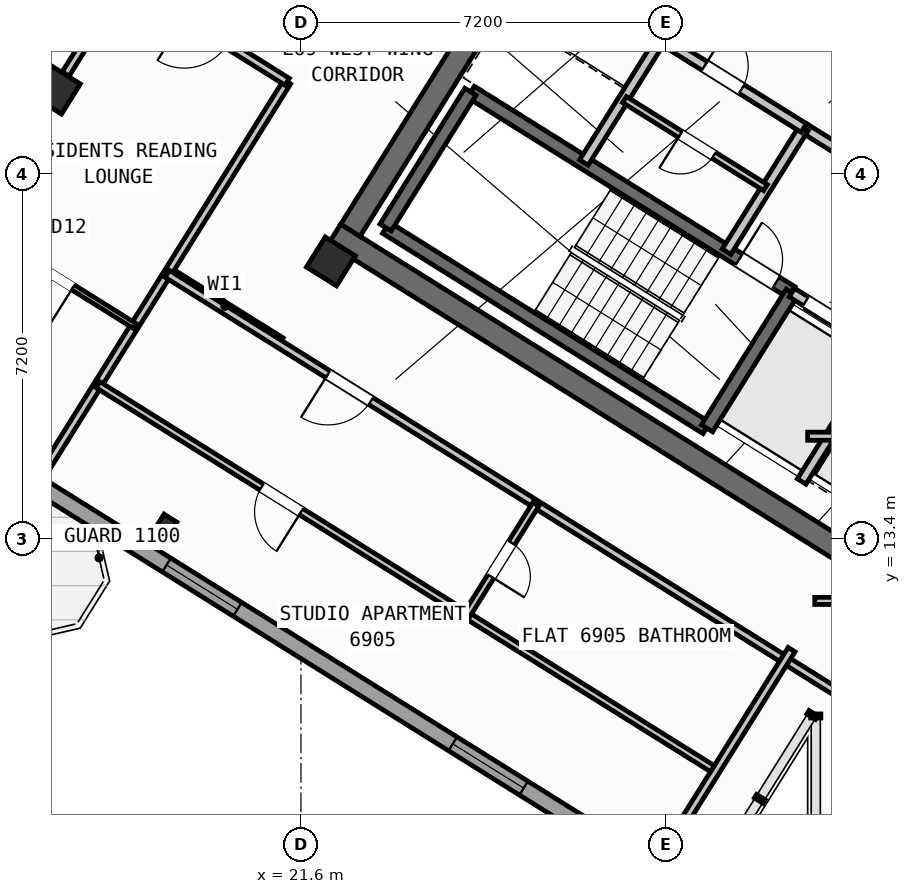
"""IFC4 building model, lengths in metres.
Left out: names, types, materials, properties, quantities, classifications, styles, units other than length and angle.
Written with IfcOpenShell. Run it as: python <this file> out.ifc"""

import sys

from ifc_helpers import new_model, si_unit, direction, frame, frame_2d, origin, origin_2d, place, context, subcontext, project, spatial, rectangle, hollow_rectangle, i_section, extrude, source, transform, mapped, element, fill, save


model = new_model("IFC4")
c1 = context("Model", 3, precision=1e-05, world=origin(), true_north=direction((0.0, 1.0)))
c2 = subcontext(c1, "Body", "Model", "MODEL_VIEW")
j1 = project(units=[si_unit("LENGTHUNIT", "METRE"), si_unit("PLANEANGLEUNIT", "RADIAN")], contexts=[c1])
p1 = place(None, origin())
s1 = spatial("IfcSite", under=j1, at=p1, CompositionType="ELEMENT")
p2 = place(p1, origin())
s2 = spatial("IfcBuilding", under=s1, at=p2, CompositionType="ELEMENT")
p3 = place(p2, frame((0.0, 0.0, 273.6)))
s3 = spatial("IfcBuildingStorey", under=s2, at=p3, CompositionType="ELEMENT", Elevation=273.6)
p4 = place(p3, frame((33.324, 12.503, 0.0), z_axis=(0.0, 0.0, 1.0), x_axis=(-0.848043529849, 0.529926571782, 0.0)))
e1 = element("IfcWall", 1, at=p4, inside=s3, PredefinedType="SHEAR", context=c2, shape_type="SweptSolid", body=[
    extrude(rectangle(XDim=13.04, YDim=0.45, at=frame_2d((6.52, 0.0))), origin(), (0.0, 0.0, 1.0), 3.35),
])
p5 = place(p3, frame((26.007, 24.976, 0.0), z_axis=(0.0, 0.0, 1.0), x_axis=(-0.529931155655, -0.848040665456, 0.0)))
e2 = element("IfcWall", 2, at=p5, inside=s3, PredefinedType="SHEAR", context=c2, shape_type="SweptSolid", body=[
    extrude(rectangle(XDim=6.475, YDim=0.45, at=frame_2d((3.238, 0.0))), origin(), (0.0, 0.0, 1.0), 3.35),
])
m1 = source(origin(), c2, "Body", "SweptSolid", [
    extrude(hollow_rectangle(XDim=0.7, YDim=0.7, WallThickness=0.028, at=origin_2d()), origin(), (0.0, 0.0, 1.0), 3.6),
])
p6 = place(p3, frame((22.191, 18.87, 0.0), z_axis=(0.0, 0.0, 1.0), x_axis=(-0.848048096156, 0.529919264233, 0.0)))
e3 = element("IfcColumn", 3, at=p6, inside=s3, PredefinedType="COLUMN", context=c2, shape_type="MappedRepresentation", body=[
    mapped(m1, transform((0.0, 0.0, 0.0), scale=1.0)),
])
m2 = source(origin(), c2, "Body", "SweptSolid", [
    extrude(i_section(OverallWidth=0.3, OverallDepth=0.45, WebThickness=0.014, FlangeThickness=0.026, at=origin_2d()), origin(), (0.0, 0.0, 1.0), 3.6),
])
p7 = place(p3, frame((18.906, 13.612, 0.0), z_axis=(0.0, 0.0, 1.0), x_axis=(-0.848048096156, 0.529919264233, 0.0)))
e4 = element("IfcColumn", 4, at=p7, inside=s3, PredefinedType="COLUMN", context=c2, shape_type="MappedRepresentation", body=[
    mapped(m2, transform((0.0, 0.0, 0.0), scale=1.0)),
])
p8 = place(p3, frame((16.764, 22.261, 0.0), z_axis=(0.0, 0.0, 1.0), x_axis=(-0.848048096156, 0.529919264233, 0.0)))
e5 = element("IfcColumn", 5, at=p8, inside=s3, PredefinedType="COLUMN", context=c2, shape_type="MappedRepresentation", body=[
    mapped(m1, transform((0.0, 0.0, 0.0), scale=1.0)),
])
p9 = place(p3, frame((29.268, 6.429, 0.0), z_axis=(0.0, 0.0, 1.0), x_axis=(-0.848049971435, 0.529916263149, 0.0)))
e6 = element("IfcWall", 6, at=p9, inside=s3, PredefinedType="STANDARD", context=c2, shape_type="SweptSolid", body=[
    extrude(rectangle(XDim=31.588, YDim=0.32, at=frame_2d((15.794, 0.0))), origin(), (0.0, 0.0, 1.0), 3.35),
])
p10 = place(p9, frame((16.362, 0.0, 0.0)))
e7 = element("IfcOpeningElement", 7, at=p10, cuts=e6, PredefinedType="OPENING", context=c2, shape_type="SweptSolid", body=[
    extrude(rectangle(XDim=1.2, YDim=2.15, at=frame_2d((0.6, 1.075))), frame((0.0, 0.17, 0.0), z_axis=(0.0, -1.0, 0.0), x_axis=(1.0, 0.0, 0.0)), (0.0, 0.0, 1.0), 0.34),
])
p11 = place(p9, frame((3.859, 0.0, 0.9)))
e8 = element("IfcOpeningElement", 8, at=p11, cuts=e6, PredefinedType="OPENING", context=c2, shape_type="SweptSolid", body=[
    extrude(rectangle(XDim=1.65, YDim=1.45, at=frame_2d((0.825, 0.725))), frame((0.0, 0.17, 0.0), z_axis=(0.0, -1.0, 0.0), x_axis=(1.0, 0.0, 0.0)), (0.0, 0.0, 1.0), 0.34),
])
p12 = place(p9, frame((10.519, 0.0, 0.9)))
e9 = element("IfcOpeningElement", 9, at=p12, cuts=e6, PredefinedType="OPENING", context=c2, shape_type="SweptSolid", body=[
    extrude(rectangle(XDim=1.65, YDim=1.45, at=frame_2d((0.825, 0.725))), frame((0.0, 0.17, 0.0), z_axis=(0.0, -1.0, 0.0), x_axis=(1.0, 0.0, 0.0)), (0.0, 0.0, 1.0), 0.34),
])
p13 = place(p9, frame((21.219, 0.0, 0.95)))
e10 = element("IfcOpeningElement", 10, at=p13, cuts=e6, PredefinedType="OPENING", context=c2, shape_type="SweptSolid", body=[
    extrude(rectangle(XDim=1.95, YDim=1.35, at=frame_2d((0.975, 0.675))), frame((0.0, 0.17, 0.0), z_axis=(0.0, -1.0, 0.0), x_axis=(1.0, 0.0, 0.0)), (0.0, 0.0, 1.0), 0.34),
])
p14 = place(p9, frame((26.406, 0.0, 1.0)))
e11 = element("IfcOpeningElement", 11, at=p14, cuts=e6, PredefinedType="OPENING", context=c2, shape_type="SweptSolid", body=[
    extrude(rectangle(XDim=0.9, YDim=1.25, at=frame_2d((0.45, 0.625))), frame((0.0, 0.17, 0.0), z_axis=(0.0, -1.0, 0.0), x_axis=(1.0, 0.0, 0.0)), (0.0, 0.0, 1.0), 0.34),
])
p15 = place(p9, frame((29.143, 0.0, 0.9)))
e12 = element("IfcOpeningElement", 12, at=p15, cuts=e6, PredefinedType="OPENING", context=c2, shape_type="SweptSolid", body=[
    extrude(rectangle(XDim=1.65, YDim=1.45, at=frame_2d((0.825, 0.725))), frame((0.0, 0.17, 0.0), z_axis=(0.0, -1.0, 0.0), x_axis=(1.0, 0.0, 0.0)), (0.0, 0.0, 1.0), 0.34),
])
p16 = place(p3, frame((29.605, 15.581, 0.0), z_axis=(0.0, 0.0, 1.0), x_axis=(-0.848036911448, 0.529937163087, 0.0)))
e13 = element("IfcWall", 13, at=p16, inside=s3, PredefinedType="SHEAR", context=c2, shape_type="SweptSolid", body=[
    extrude(rectangle(XDim=7.46, YDim=0.26, at=frame_2d((3.73, 0.0))), origin(), (0.0, 0.0, 1.0), 3.35),
])
p17 = place(p3, frame((31.28, 18.261, 0.0), z_axis=(0.0, 0.0, 1.0), x_axis=(-0.848051618787, 0.529913626805, 0.0)))
e14 = element("IfcWall", 14, at=p17, inside=s3, PredefinedType="SHEAR", context=c2, shape_type="SweptSolid", body=[
    extrude(rectangle(XDim=7.46, YDim=0.26, at=frame_2d((3.73, 0.0))), origin(), (0.0, 0.0, 1.0), 3.35),
])
p18 = place(p17, frame((0.36, 0.0, 0.0)))
e15 = element("IfcOpeningElement", 15, at=p18, cuts=e14, PredefinedType="OPENING", context=c2, shape_type="SweptSolid", body=[
    extrude(rectangle(XDim=0.86, YDim=2.05, at=frame_2d((0.43, 1.025))), frame((0.0, 0.14, 0.0), z_axis=(0.0, -1.0, 0.0), x_axis=(1.0, 0.0, 0.0)), (0.0, 0.0, 1.0), 0.28),
])
p19 = place(p3, frame((31.288, 18.256, 0.0), z_axis=(0.0, 0.0, 1.0), x_axis=(-0.529943379326, -0.848033026897, 0.0)))
e16 = element("IfcWall", 16, at=p19, inside=s3, PredefinedType="SHEAR", context=c2, shape_type="SweptSolid", body=[
    extrude(rectangle(XDim=3.16, YDim=0.26, at=frame_2d((1.58, 0.0))), origin(), (0.0, 0.0, 1.0), 3.35),
])
p20 = place(p3, frame((24.945, 22.22, 0.0), z_axis=(0.0, 0.0, 1.0), x_axis=(-0.529908658664, -0.84805472316, 0.0)))
e17 = element("IfcWall", 17, at=p20, inside=s3, PredefinedType="SHEAR", context=c2, shape_type="SweptSolid", body=[
    extrude(rectangle(XDim=3.16, YDim=0.26, at=frame_2d((1.58, 0.0))), origin(), (0.0, 0.0, 1.0), 3.35),
])
p21 = place(p3, frame((38.046, 21.108, 0.0), z_axis=(0.0, 0.0, 1.0), x_axis=(-0.848054434086, 0.529909121291, 0.0)))
e18 = element("IfcWall", 18, at=p21, inside=s3, PredefinedType="SHEAR", context=c2, shape_type="SweptSolid", body=[
    extrude(rectangle(XDim=7.33, YDim=0.26, at=frame_2d((3.665, 0.0))), origin(), (0.0, 0.0, 1.0), 3.35),
])
p22 = place(p21, frame((0.22, 0.0, 0.0)))
e19 = element("IfcOpeningElement", 19, at=p22, cuts=e18, PredefinedType="OPENING", context=c2, shape_type="SweptSolid", body=[
    extrude(rectangle(XDim=1.1, YDim=2.1, at=frame_2d((0.55, 1.05))), frame((0.0, 0.14, 0.0), z_axis=(0.0, -1.0, 0.0), x_axis=(1.0, 0.0, 0.0)), (0.0, 0.0, 1.0), 0.28),
])
p23 = place(p3, frame((34.933, 15.978, 0.0), z_axis=(0.0, 0.0, 1.0), x_axis=(-0.848055739377, 0.529907032327, 0.0)))
e20 = element("IfcWall", 20, at=p23, inside=s3, PredefinedType="STANDARD", context=c2, shape_type="SweptSolid", body=[
    extrude(rectangle(XDim=4.298, YDim=0.2, at=frame_2d((2.149, 0.0))), origin(), (0.0, 0.0, 1.0), 3.34),
])
p24 = place(p23, frame((0.448, 0.0, 0.0)))
e21 = element("IfcOpeningElement", 21, at=p24, cuts=e20, PredefinedType="OPENING", context=c2, shape_type="SweptSolid", body=[
    extrude(rectangle(XDim=1.3, YDim=2.2, at=frame_2d((0.65, 1.1))), frame((0.0, 0.11, 0.0), z_axis=(0.0, -1.0, 0.0), x_axis=(1.0, 0.0, 0.0)), (0.0, 0.0, 1.0), 0.22),
])
p25 = place(p23, frame((2.523, 0.0, 0.0)))
e22 = element("IfcOpeningElement", 22, at=p25, cuts=e20, PredefinedType="OPENING", context=c2, shape_type="SweptSolid", body=[
    extrude(rectangle(XDim=1.45, YDim=2.25, at=frame_2d((0.725, 1.125))), frame((0.0, 0.11, 0.0), z_axis=(0.0, -1.0, 0.0), x_axis=(1.0, 0.0, 0.0)), (0.0, 0.0, 1.0), 0.22),
])
p26 = place(p3, frame((36.459, 18.421, 0.0), z_axis=(0.0, 0.0, 1.0), x_axis=(-0.848059591691, 0.529900867089, 0.0)))
e23 = element("IfcWall", 23, at=p26, inside=s3, PredefinedType="STANDARD", context=c2, shape_type="SweptSolid", body=[
    extrude(rectangle(XDim=5.818, YDim=0.2, at=frame_2d((2.909, 0.0))), origin(), (0.0, 0.0, 1.0), 3.34),
])
p27 = place(p26, frame((2.598, 0.0, 0.0)))
e24 = element("IfcOpeningElement", 24, at=p27, cuts=e23, PredefinedType="OPENING", context=c2, shape_type="SweptSolid", body=[
    extrude(rectangle(XDim=1.15, YDim=2.1, at=frame_2d((0.575, 1.05))), frame((0.0, 0.11, 0.0), z_axis=(0.0, -1.0, 0.0), x_axis=(1.0, 0.0, 0.0)), (0.0, 0.0, 1.0), 0.22),
])
p28 = place(p3, frame((33.029, 17.003, 0.0), z_axis=(0.0, 0.0, 1.0), x_axis=(-0.529916267533, -0.848049968695, 0.0)))
e25 = element("IfcWall", 25, at=p28, inside=s3, PredefinedType="STANDARD", context=c2, shape_type="SweptSolid", body=[
    extrude(rectangle(XDim=2.92, YDim=0.2, at=frame_2d((1.46, 0.0))), origin(), (0.0, 0.0, 1.0), 3.34),
])
for number, where, z_axis, x_axis in (
    (26, (31.525, 21.504, 0.0), (0.0, 0.0, 1.0), (-0.53, -0.848, 0.0)),
    (27, (28.71, 23.263, 0.0), (0.0, 0.0, 1.0), (-0.53, -0.848, 0.0)),
):
    element("IfcWall", number, at=place(p3, frame(where, z_axis=z_axis, x_axis=x_axis)), inside=s3, PredefinedType="STANDARD", context=c2, shape_type="SweptSolid", body=[
        extrude(rectangle(XDim=2.88, YDim=0.2, at=frame_2d((1.44, 0.0))), origin(), (0.0, 0.0, 1.0), 3.34),
    ])
p29 = place(p3, frame((31.525, 21.504, 0.0), z_axis=(0.0, 0.0, 1.0), x_axis=(-0.848042066329, 0.529928913853, 0.0)))
e28 = element("IfcWall", 28, at=p29, inside=s3, PredefinedType="STANDARD", context=c2, shape_type="SweptSolid", body=[
    extrude(rectangle(XDim=6.268, YDim=0.2, at=frame_2d((3.134, 0.0))), origin(), (0.0, 0.0, 1.0), 3.34),
])
p30 = place(p29, frame((4.4, 0.0, 0.0)))
e29 = element("IfcOpeningElement", 29, at=p30, cuts=e28, PredefinedType="OPENING", context=c2, shape_type="SweptSolid", body=[
    extrude(rectangle(XDim=0.86, YDim=2.05, at=frame_2d((0.43, 1.025))), frame((0.0, 0.11, 0.0), z_axis=(0.0, -1.0, 0.0), x_axis=(1.0, 0.0, 0.0)), (0.0, 0.0, 1.0), 0.22),
])
p31 = place(p29, frame((1.45, 0.0, 0.0)))
e30 = element("IfcOpeningElement", 30, at=p31, cuts=e28, PredefinedType="OPENING", context=c2, shape_type="SweptSolid", body=[
    extrude(rectangle(XDim=0.86, YDim=2.05, at=frame_2d((0.43, 1.025))), frame((0.0, 0.11, 0.0), z_axis=(0.0, -1.0, 0.0), x_axis=(1.0, 0.0, 0.0)), (0.0, 0.0, 1.0), 0.22),
])
p32 = place(p3, frame((30.766, 20.327, 0.0), z_axis=(0.0, 0.0, 1.0), x_axis=(-0.848052663127, 0.529911955482, 0.0)))
e31 = element("IfcWall", 31, at=p32, inside=s3, PredefinedType="PLUMBINGWALL", context=c2, shape_type="SweptSolid", body=[
    extrude(rectangle(XDim=3.28, YDim=0.14, at=frame_2d((1.64, 0.0))), origin(), (0.0, 0.0, 1.0), 3.34),
])
p33 = place(p32, frame((1.2, 0.0, 0.0)))
e32 = element("IfcOpeningElement", 32, at=p33, cuts=e31, PredefinedType="OPENING", context=c2, shape_type="SweptSolid", body=[
    extrude(rectangle(XDim=0.78, YDim=2.05, at=frame_2d((0.39, 1.025))), frame((0.0, 0.08, 0.0), z_axis=(0.0, -1.0, 0.0), x_axis=(1.0, 0.0, 0.0)), (0.0, 0.0, 1.0), 0.16),
])
p34 = place(p3, frame((21.206, 17.292, 0.0), z_axis=(0.0, 0.0, 1.0), x_axis=(-0.848050851465, 0.529914854792, 0.0)))
e33 = element("IfcWall", 33, at=p34, inside=s3, PredefinedType="PARTITIONING", context=c2, shape_type="SweptSolid", body=[
    extrude(rectangle(XDim=2.61, YDim=0.16, at=frame_2d((1.305, 0.0))), origin(), (0.0, 0.0, 1.0), 3.34),
])
p35 = place(p3, frame((21.329, 22.416, 0.0), z_axis=(0.0, 0.0, 1.0), x_axis=(-0.529920220799, -0.848047498427, 0.0)))
e34 = element("IfcWall", 34, at=p35, inside=s3, PredefinedType="PARTITIONING", context=c2, shape_type="SweptSolid", body=[
    extrude(rectangle(XDim=9.2, YDim=0.16, at=frame_2d((4.6, 0.0))), origin(), (0.0, 0.0, 1.0), 3.34),
])
p36 = place(p3, frame((21.329, 22.416, 0.0), z_axis=(0.0, 0.0, 1.0), x_axis=(-0.848052408131, 0.529912363569, 0.0)))
e35 = element("IfcWall", 35, at=p36, inside=s3, PredefinedType="PARTITIONING", context=c2, shape_type="SweptSolid", body=[
    extrude(rectangle(XDim=16.73, YDim=0.16, at=frame_2d((8.365, 0.0))), origin(), (0.0, 0.0, 1.0), 3.34),
])
p37 = place(p36, frame((1.395, 0.0, 0.0)))
e36 = element("IfcOpeningElement", 36, at=p37, cuts=e35, PredefinedType="OPENING", context=c2, shape_type="SweptSolid", body=[
    extrude(rectangle(XDim=1.0, YDim=2.1, at=frame_2d((0.5, 1.05))), frame((0.0, 0.09, 0.0), z_axis=(0.0, -1.0, 0.0), x_axis=(1.0, 0.0, 0.0)), (0.0, 0.0, 1.0), 0.18),
])
p38 = place(p36, frame((7.82, 0.0, 0.0)))
e37 = element("IfcOpeningElement", 37, at=p38, cuts=e35, PredefinedType="OPENING", context=c2, shape_type="SweptSolid", body=[
    extrude(rectangle(XDim=1.0, YDim=2.1, at=frame_2d((0.5, 1.05))), frame((0.0, 0.09, 0.0), z_axis=(0.0, -1.0, 0.0), x_axis=(1.0, 0.0, 0.0)), (0.0, 0.0, 1.0), 0.18),
])
p39 = place(p36, frame((11.14, 0.0, 0.0)))
e38 = element("IfcOpeningElement", 38, at=p39, cuts=e35, PredefinedType="OPENING", context=c2, shape_type="SweptSolid", body=[
    extrude(rectangle(XDim=1.0, YDim=2.1, at=frame_2d((0.5, 1.05))), frame((0.0, 0.09, 0.0), z_axis=(0.0, -1.0, 0.0), x_axis=(1.0, 0.0, 0.0)), (0.0, 0.0, 1.0), 0.18),
])
p40 = place(p3, frame((18.115, 24.424, 0.0), z_axis=(0.0, 0.0, 1.0), x_axis=(-0.529998940003, -0.847998304005, 0.0)))
e39 = element("IfcWall", 39, at=p40, inside=s3, PredefinedType="PARTITIONING", context=c2, shape_type="SweptSolid", body=[
    extrude(rectangle(XDim=2.188, YDim=0.16, at=frame_2d((1.094, 0.0))), origin(), (0.0, 0.0, 1.0), 2.875),
])
p41 = place(p3, frame((18.318, 17.597, 0.0), z_axis=(0.0, 0.0, 1.0), x_axis=(-0.848059820872, 0.529900500304, 0.0)))
e40 = element("IfcWall", 40, at=p41, inside=s3, PredefinedType="PARTITIONING", context=c2, shape_type="SweptSolid", body=[
    extrude(rectangle(XDim=3.79, YDim=0.11, at=frame_2d((1.895, 0.0))), origin(), (0.0, 0.0, 1.0), 3.34),
])
p42 = place(p41, frame((1.435, 0.0, 0.0)))
e41 = element("IfcOpeningElement", 41, at=p42, cuts=e40, PredefinedType="OPENING", context=c2, shape_type="SweptSolid", body=[
    extrude(rectangle(XDim=0.92, YDim=2.08, at=frame_2d((0.46, 1.04))), frame((0.0, 0.065, 0.0), z_axis=(0.0, -1.0, 0.0), x_axis=(1.0, 0.0, 0.0)), (0.0, 0.0, 1.0), 0.13),
])
p43 = place(p3, frame((32.164, 10.374, 0.0), z_axis=(0.0, 0.0, 1.0), x_axis=(-0.848044107957, 0.529925646633, 0.0)))
e42 = element("IfcWall", 42, at=p43, inside=s3, PredefinedType="PARTITIONING", context=c2, shape_type="SweptSolid", body=[
    extrude(rectangle(XDim=15.57, YDim=0.16, at=frame_2d((7.785, 0.0))), origin(), (0.0, 0.0, 1.0), 3.34),
])
p44 = place(p43, frame((10.83, 0.0, 0.0)))
e43 = element("IfcOpeningElement", 43, at=p44, cuts=e42, PredefinedType="OPENING", context=c2, shape_type="SweptSolid", body=[
    extrude(rectangle(XDim=1.0, YDim=2.1, at=frame_2d((0.5, 1.05))), frame((0.0, 0.09, 0.0), z_axis=(0.0, -1.0, 0.0), x_axis=(1.0, 0.0, 0.0)), (0.0, 0.0, 1.0), 0.18),
])
p45 = place(p3, frame((31.282, 11.208, 0.0), z_axis=(0.0, 0.0, 1.0), x_axis=(-0.529938869374, -0.84803584519, 0.0)))
e44 = element("IfcWall", 44, at=p45, inside=s3, PredefinedType="PARTITIONING", context=c2, shape_type="SweptSolid", body=[
    extrude(rectangle(XDim=5.48, YDim=0.16, at=frame_2d((2.74, 0.0))), origin(), (0.0, 0.0, 1.0), 3.34),
])
p46 = place(p3, frame((29.72, 8.859, 0.0), z_axis=(0.0, 0.0, 1.0), x_axis=(-0.848049134363, 0.529917602752, 0.0)))
e45 = element("IfcWall", 45, at=p46, inside=s3, PredefinedType="PLUMBINGWALL", context=c2, shape_type="SweptSolid", body=[
    extrude(rectangle(XDim=14.3, YDim=0.14, at=frame_2d((7.15, 0.0))), origin(), (0.0, 0.0, 1.0), 3.34),
])
p47 = place(p46, frame((9.57, 0.0, 0.0)))
e46 = element("IfcOpeningElement", 46, at=p47, cuts=e45, PredefinedType="OPENING", context=c2, shape_type="SweptSolid", body=[
    extrude(rectangle(XDim=0.92, YDim=2.08, at=frame_2d((0.46, 1.04))), frame((0.0, 0.08, 0.0), z_axis=(0.0, -1.0, 0.0), x_axis=(1.0, 0.0, 0.0)), (0.0, 0.0, 1.0), 0.16),
])
p48 = place(p3, frame((26.237, 14.078, 0.0), z_axis=(0.0, 0.0, 1.0), x_axis=(-0.52995640672, -0.848024885824, 0.0)))
e47 = element("IfcWall", 47, at=p48, inside=s3, PredefinedType="PLUMBINGWALL", context=c2, shape_type="SweptSolid", body=[
    extrude(rectangle(XDim=2.58, YDim=0.14, at=frame_2d((1.29, 0.0))), origin(), (0.0, 0.0, 1.0), 3.34),
])
p49 = place(p48, frame((0.9, 0.0, 0.0)))
e48 = element("IfcOpeningElement", 48, at=p49, cuts=e47, PredefinedType="OPENING", context=c2, shape_type="SweptSolid", body=[
    extrude(rectangle(XDim=0.78, YDim=2.05, at=frame_2d((0.39, 1.025))), frame((0.0, 0.08, 0.0), z_axis=(0.0, -1.0, 0.0), x_axis=(1.0, 0.0, 0.0)), (0.0, 0.0, 1.0), 0.16),
])
p50 = place(p3, frame((31.6, 15.42, 0.0), z_axis=(0.0, 0.0, 1.0), x_axis=(1.0, 0.0, 0.0)))
e49 = element("IfcWall", 49, at=p50, inside=s3, PredefinedType="PARTITIONING", context=c2, shape_type="SweptSolid", body=[
    extrude(rectangle(XDim=2.984, YDim=0.16, at=frame_2d((1.492, 0.0))), origin(), (0.0, 0.0, 1.0), 3.34),
])
p51 = place(p3, frame((31.74, 12.17, 0.0), z_axis=(0.0, 0.0, 1.0), x_axis=(1.0, 0.0, 0.0)))
e50 = element("IfcWall", 50, at=p51, inside=s3, PredefinedType="PLUMBINGWALL", context=c2, shape_type="SweptSolid", body=[
    extrude(rectangle(XDim=0.931, YDim=0.14, at=frame_2d((0.466, 0.0))), origin(), (0.0, 0.0, 1.0), 3.34),
])
m3 = source(origin(), c2, "Body", "SweptSolid", [
    extrude(rectangle(XDim=1.65, YDim=1.45, at=frame_2d((0.825, 0.725))), frame((0.0, 0.03, 0.0), z_axis=(0.0, -1.0, 0.0), x_axis=(1.0, 0.0, 0.0)), (0.0, 0.0, 1.0), 0.06),
])
p52 = place(p11, origin())
e51 = element("IfcWindow", 51, at=p52, inside=s3, PartitioningType="SINGLE_PANEL", PredefinedType="WINDOW", context=c2, shape_type="MappedRepresentation", body=[
    mapped(m3, transform((0.0, 0.0, 0.0), scale=1.0)),
])
fill(e8, e51)
p53 = place(p12, origin())
e52 = element("IfcWindow", 52, at=p53, inside=s3, PartitioningType="SINGLE_PANEL", PredefinedType="WINDOW", context=c2, shape_type="MappedRepresentation", body=[
    mapped(m3, transform((0.0, 0.0, 0.0), scale=1.0)),
])
fill(e9, e52)
m4 = source(origin(), c2, "Body", "SweptSolid", [
    extrude(rectangle(XDim=0.86, YDim=2.05, at=frame_2d((0.43, 1.025))), frame((0.0, 0.025, 0.0), z_axis=(0.0, -1.0, 0.0), x_axis=(1.0, 0.0, 0.0)), (0.0, 0.0, 1.0), 0.05),
])
p54 = place(p18, frame((0.86, 0.0, 0.0), z_axis=(0.0, 0.0, 1.0), x_axis=(-1.0, 0.0, 0.0)))
e53 = element("IfcDoor", 53, at=p54, inside=s3, OperationType="SINGLE_SWING_LEFT", PredefinedType="DOOR", context=c2, shape_type="MappedRepresentation", body=[
    mapped(m4, transform((0.0, 0.0, 0.0), scale=1.0)),
])
fill(e15, e53)
m5 = source(origin(), c2, "Body", "SweptSolid", [
    extrude(rectangle(XDim=1.45, YDim=2.25, at=frame_2d((0.725, 1.125))), frame((0.0, 0.025, 0.0), z_axis=(0.0, -1.0, 0.0), x_axis=(1.0, 0.0, 0.0)), (0.0, 0.0, 1.0), 0.05),
])
p55 = place(p25, origin())
e54 = element("IfcDoor", 54, at=p55, inside=s3, OperationType="DOUBLE_DOOR_SLIDING", PredefinedType="DOOR", context=c2, shape_type="MappedRepresentation", body=[
    mapped(m5, transform((0.0, 0.0, 0.0), scale=1.0)),
])
fill(e22, e54)
p56 = place(p31, frame((0.86, 0.0, 0.0), z_axis=(0.0, 0.0, 1.0), x_axis=(-1.0, 0.0, 0.0)))
e55 = element("IfcDoor", 55, at=p56, inside=s3, OperationType="SINGLE_SWING_LEFT", PredefinedType="DOOR", context=c2, shape_type="MappedRepresentation", body=[
    mapped(m4, transform((0.0, 0.0, 0.0), scale=1.0)),
])
fill(e30, e55)
m6 = source(origin(), c2, "Body", "SweptSolid", [
    extrude(rectangle(XDim=0.78, YDim=2.05, at=frame_2d((0.39, 1.025))), frame((0.0, 0.025, 0.0), z_axis=(0.0, -1.0, 0.0), x_axis=(1.0, 0.0, 0.0)), (0.0, 0.0, 1.0), 0.05),
])
p57 = place(p33, origin())
e56 = element("IfcDoor", 56, at=p57, inside=s3, OperationType="SINGLE_SWING_RIGHT", PredefinedType="DOOR", context=c2, shape_type="MappedRepresentation", body=[
    mapped(m6, transform((0.0, 0.0, 0.0), scale=1.0)),
])
fill(e32, e56)
m7 = source(origin(), c2, "Body", "SweptSolid", [
    extrude(rectangle(XDim=0.92, YDim=2.08, at=frame_2d((0.46, 1.04))), frame((0.0, 0.025, 0.0), z_axis=(0.0, -1.0, 0.0), x_axis=(1.0, 0.0, 0.0)), (0.0, 0.0, 1.0), 0.05),
])
p58 = place(p42, origin())
e57 = element("IfcDoor", 57, at=p58, inside=s3, OperationType="SINGLE_SWING_LEFT", PredefinedType="DOOR", context=c2, shape_type="MappedRepresentation", body=[
    mapped(m7, transform((0.0, 0.0, 0.0), scale=1.0)),
])
fill(e41, e57)
m8 = source(origin(), c2, "Body", "SweptSolid", [
    extrude(rectangle(XDim=1.0, YDim=2.1, at=frame_2d((0.5, 1.05))), frame((0.0, 0.025, 0.0), z_axis=(0.0, -1.0, 0.0), x_axis=(1.0, 0.0, 0.0)), (0.0, 0.0, 1.0), 0.05),
])
p59 = place(p44, origin())
e58 = element("IfcDoor", 58, at=p59, inside=s3, OperationType="SINGLE_SWING_RIGHT", PredefinedType="DOOR", context=c2, shape_type="MappedRepresentation", body=[
    mapped(m8, transform((0.0, 0.0, 0.0), scale=1.0)),
])
fill(e43, e58)
p60 = place(p47, origin())
e59 = element("IfcDoor", 59, at=p60, inside=s3, OperationType="SINGLE_SWING_LEFT", PredefinedType="DOOR", context=c2, shape_type="MappedRepresentation", body=[
    mapped(m7, transform((0.0, 0.0, 0.0), scale=1.0)),
])
fill(e46, e59)
p61 = place(p49, origin())
e60 = element("IfcDoor", 60, at=p61, inside=s3, OperationType="SINGLE_SWING_RIGHT", PredefinedType="DOOR", context=c2, shape_type="MappedRepresentation", body=[
    mapped(m6, transform((0.0, 0.0, 0.0), scale=1.0)),
])
fill(e48, e60)
save(model, sys.argv[1])
